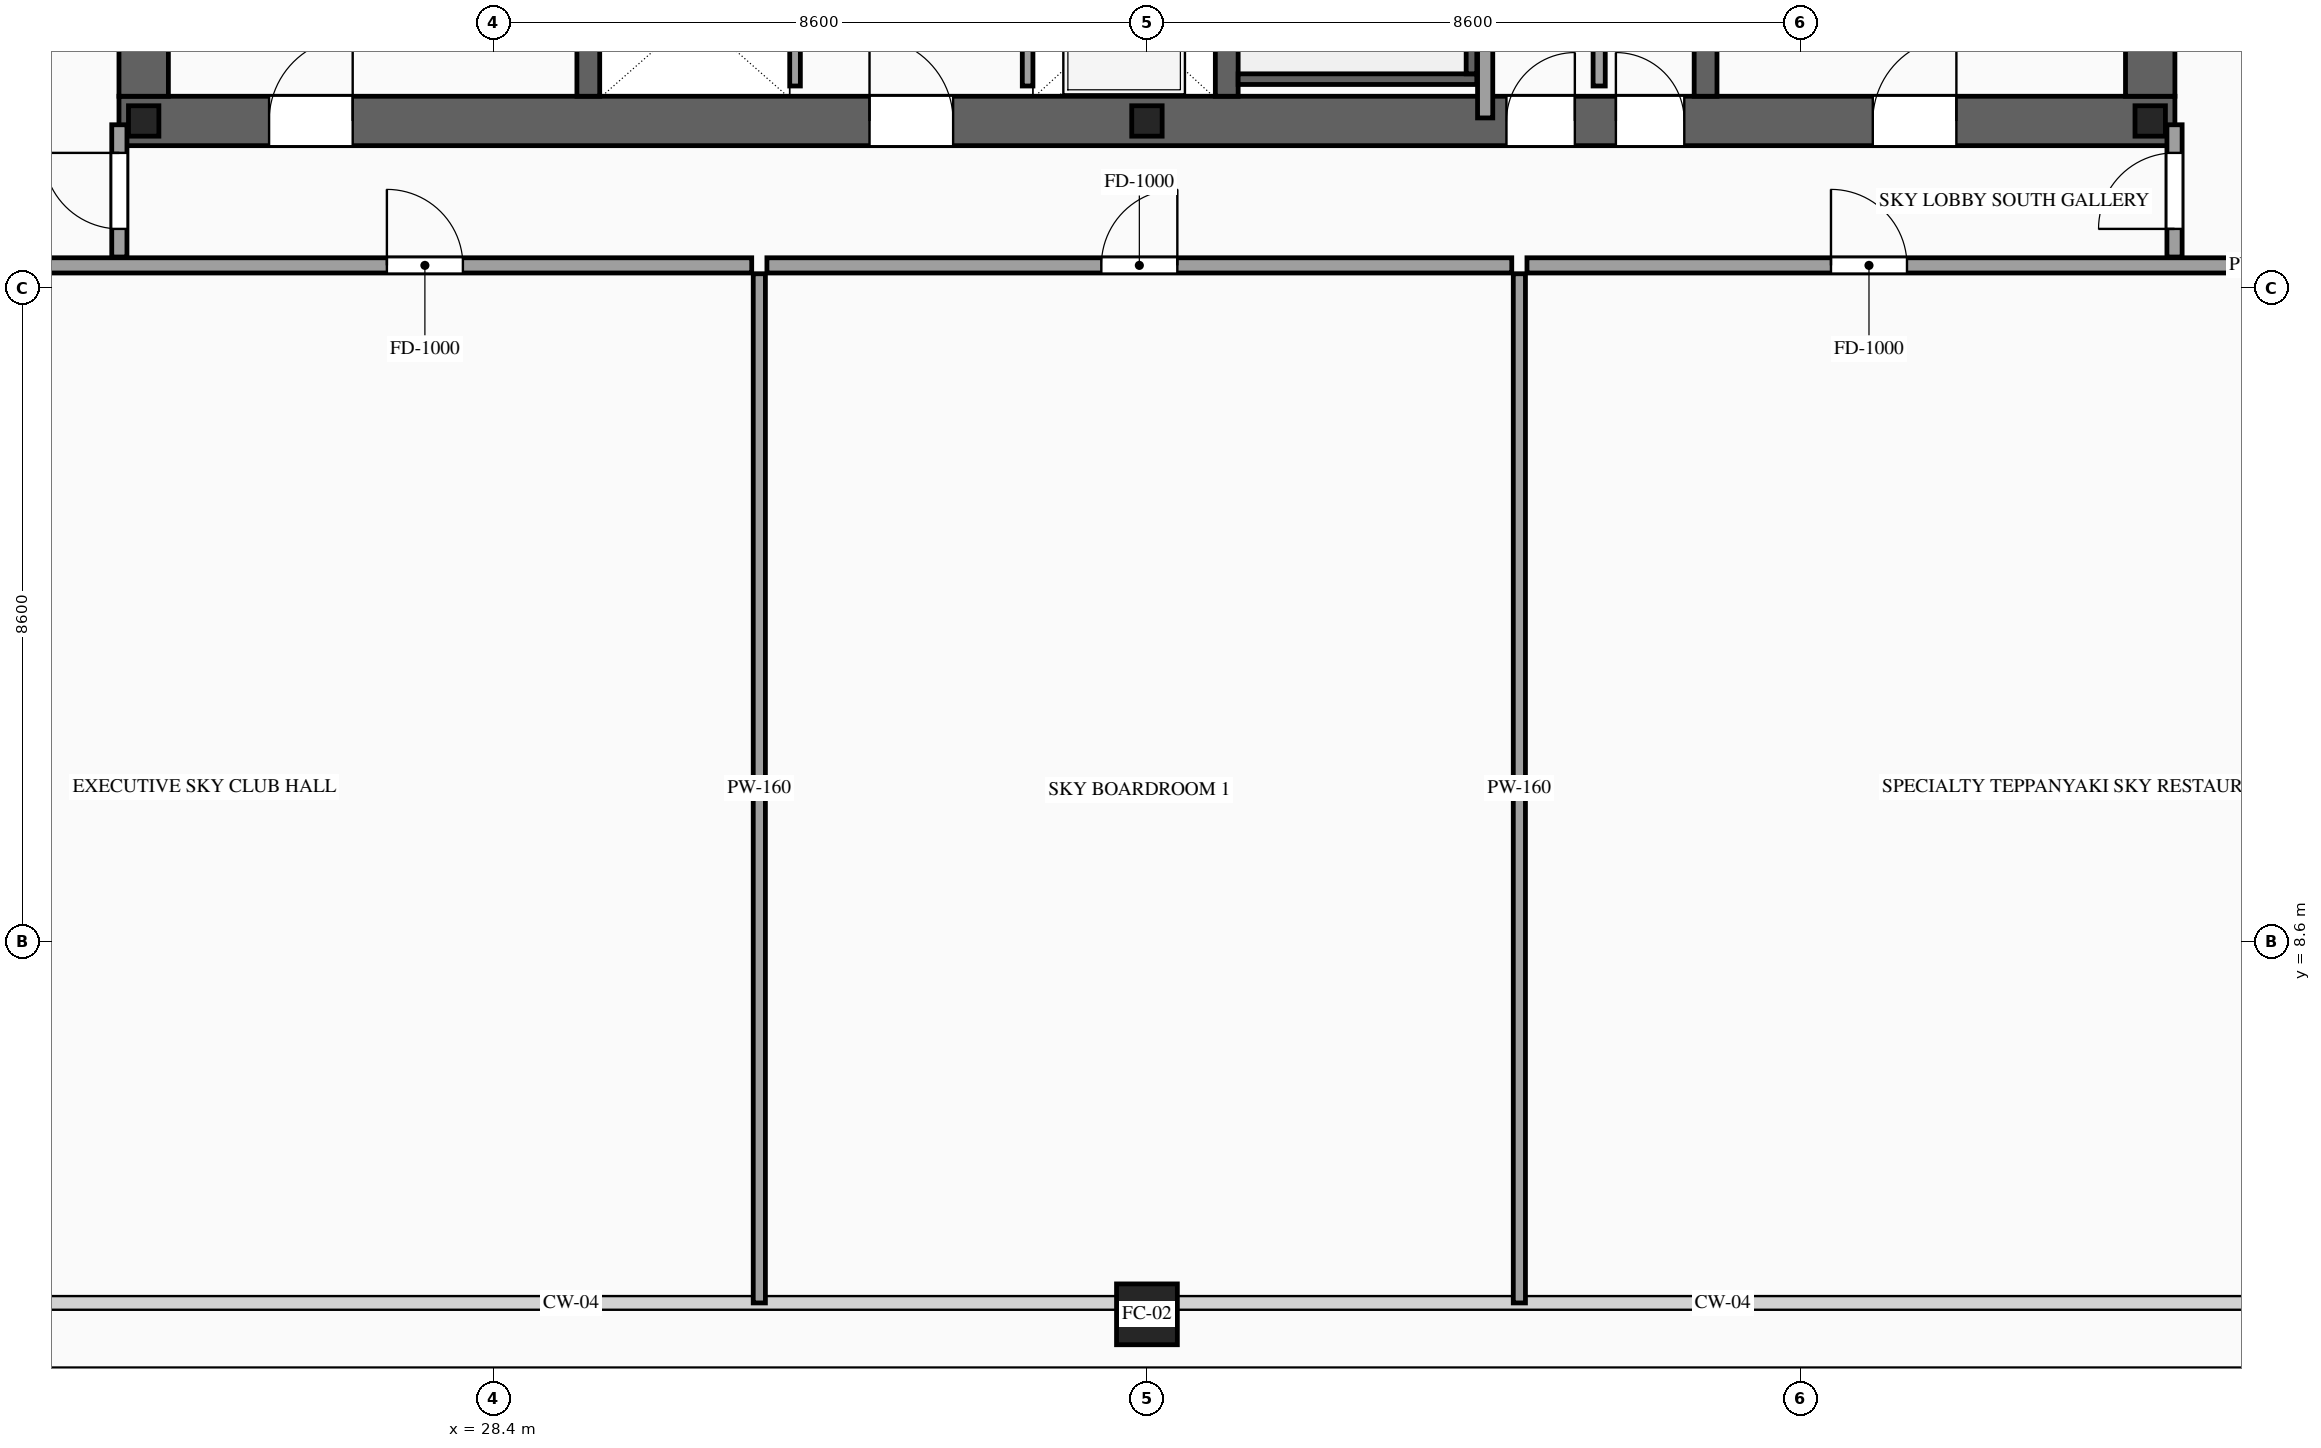
"""IFC4 building model, lengths in metres.
Left out: names, types, materials, properties, quantities, classifications, styles, units other than length and angle.
Written with IfcOpenShell. Run it as: python <this file> out.ifc"""

import sys

from ifc_helpers import new_model, si_unit, direction, frame, frame_2d, origin, origin_2d, place, context, subcontext, project, spatial, rectangle, hollow_rectangle, i_section, extrude, source, transform, mapped, element, fill, save


model = new_model("IFC4")
c1 = context("Model", 3, precision=1e-05, world=origin(), true_north=direction((0.0, 1.0)))
c2 = subcontext(c1, "Body", "Model", "MODEL_VIEW")
j1 = project(units=[si_unit("LENGTHUNIT", "METRE"), si_unit("PLANEANGLEUNIT", "RADIAN")], contexts=[c1])
p1 = place(None, origin())
s1 = spatial("IfcSite", under=j1, at=p1, CompositionType="ELEMENT")
p2 = place(p1, origin())
s2 = spatial("IfcBuilding", under=s1, at=p2, CompositionType="ELEMENT")
p3 = place(p2, frame((0.0, 0.0, 171.6)))
s3 = spatial("IfcBuildingStorey", under=s2, at=p3, CompositionType="ELEMENT", Elevation=171.6)
p4 = place(p3, frame((23.475, 19.4, 0.0), z_axis=(0.0, 0.0, 1.0), x_axis=(1.0, 0.0, 0.0)))
e1 = element("IfcWall", 1, at=p4, inside=s3, PredefinedType="SHEAR", context=c2, shape_type="SweptSolid", body=[
    extrude(rectangle(XDim=27.05, YDim=0.65, at=frame_2d((13.525, 0.0))), origin(), (0.0, 0.0, 1.0), 4.8),
])
p5 = place(p4, frame((1.975, 0.0, 0.0)))
e2 = element("IfcOpeningElement", 2, at=p5, cuts=e1, PredefinedType="OPENING", context=c2, shape_type="SweptSolid", body=[
    extrude(rectangle(XDim=1.1, YDim=2.2, at=frame_2d((0.55, 1.1))), frame((0.0, 0.34, 0.0), z_axis=(0.0, -1.0, 0.0), x_axis=(1.0, 0.0, 0.0)), (0.0, 0.0, 1.0), 0.68),
])
p6 = place(p4, frame((9.875, 0.0, 0.0)))
e3 = element("IfcOpeningElement", 3, at=p6, cuts=e1, PredefinedType="OPENING", context=c2, shape_type="SweptSolid", body=[
    extrude(rectangle(XDim=1.1, YDim=2.2, at=frame_2d((0.55, 1.1))), frame((0.0, 0.34, 0.0), z_axis=(0.0, -1.0, 0.0), x_axis=(1.0, 0.0, 0.0)), (0.0, 0.0, 1.0), 0.68),
])
p7 = place(p4, frame((23.075, 0.0, 0.0)))
e4 = element("IfcOpeningElement", 4, at=p7, cuts=e1, PredefinedType="OPENING", context=c2, shape_type="SweptSolid", body=[
    extrude(rectangle(XDim=1.1, YDim=2.2, at=frame_2d((0.55, 1.1))), frame((0.0, 0.34, 0.0), z_axis=(0.0, -1.0, 0.0), x_axis=(1.0, 0.0, 0.0)), (0.0, 0.0, 1.0), 0.68),
])
p8 = place(p4, frame((19.695, 0.0, 0.0)))
e5 = element("IfcOpeningElement", 5, at=p8, cuts=e1, PredefinedType="OPENING", context=c2, shape_type="SweptSolid", body=[
    extrude(rectangle(XDim=0.9, YDim=2.15, at=frame_2d((0.45, 1.075))), frame((0.0, 0.34, 0.0), z_axis=(0.0, -1.0, 0.0), x_axis=(1.0, 0.0, 0.0)), (0.0, 0.0, 1.0), 0.68),
])
p9 = place(p4, frame((18.255, 0.0, 0.0)))
e6 = element("IfcOpeningElement", 6, at=p9, cuts=e1, PredefinedType="OPENING", context=c2, shape_type="SweptSolid", body=[
    extrude(rectangle(XDim=0.9, YDim=2.15, at=frame_2d((0.45, 1.075))), frame((0.0, 0.34, 0.0), z_axis=(0.0, -1.0, 0.0), x_axis=(1.0, 0.0, 0.0)), (0.0, 0.0, 1.0), 0.68),
])
m1 = source(origin(), c2, "Body", "SweptSolid", [
    extrude(rectangle(XDim=12.15, YDim=0.65, at=frame_2d((6.075, 0.0))), origin(), (0.0, 0.0, 1.0), 4.8),
])
for number, where, z_axis, x_axis in (
    (7, (23.8, 19.725, 0.0), (0.0, 0.0, 1.0), (0.0, 1.0, 0.0)),
    (8, (50.2, 19.725, 0.0), (0.0, 0.0, 1.0), (0.0, 1.0, 0.0)),
):
    element("IfcWall", number, at=place(p3, frame(where, z_axis=z_axis, x_axis=x_axis)), inside=s3, PredefinedType="SHEAR", context=c2, shape_type="MappedRepresentation", body=[
        mapped(m1, transform((0.0, 0.0, 0.0), scale=1.0)),
    ])
m2 = source(origin(), c2, "Body", "SweptSolid", [
    extrude(rectangle(XDim=12.15, YDim=0.3, at=frame_2d((6.075, 0.0))), origin(), (0.0, 0.0, 1.0), 4.8),
])
for number, where, z_axis, x_axis in (
    (9, (29.65, 19.725, 0.0), (0.0, 0.0, 1.0), (0.0, 1.0, 0.0)),
    (10, (38.05, 19.725, 0.0), (0.0, 0.0, 1.0), (0.0, 1.0, 0.0)),
    (11, (44.35, 19.725, 0.0), (0.0, 0.0, 1.0), (0.0, 1.0, 0.0)),
):
    element("IfcWall", number, at=place(p3, frame(where, z_axis=z_axis, x_axis=x_axis)), inside=s3, PredefinedType="SOLIDWALL", context=c2, shape_type="MappedRepresentation", body=[
        mapped(m2, transform((0.0, 0.0, 0.0), scale=1.0)),
    ])
m3 = source(origin(), c2, "Body", "SweptSolid", [
    extrude(i_section(OverallWidth=0.4, OverallDepth=0.4, WebThickness=0.013, FlangeThickness=0.021, at=origin_2d()), origin(), (0.0, 0.0, 1.0), 4.8),
])
for number, where, z_axis, x_axis in (
    (12, (23.8, 19.4, 0.0), (0.0, 0.0, 1.0), (1.0, 0.0, 0.0)),
    (13, (37.0, 19.4, 0.0), (0.0, 0.0, 1.0), (1.0, 0.0, 0.0)),
    (14, (50.2, 19.4, 0.0), (0.0, 0.0, 1.0), (1.0, 0.0, 0.0)),
):
    element("IfcColumn", number, at=place(p3, frame(where, z_axis=z_axis, x_axis=x_axis)), inside=s3, PredefinedType="COLUMN", context=c2, shape_type="MappedRepresentation", body=[
        mapped(m3, transform((0.0, 0.0, 0.0), scale=1.0)),
    ])
m4 = source(origin(), c2, "Body", "SweptSolid", [
    extrude(hollow_rectangle(XDim=0.8, YDim=0.8, WallThickness=0.036, at=origin_2d()), origin(), (0.0, 0.0, 1.0), 4.8),
])
p10 = place(p3, frame((37.0, 3.7, 0.0), z_axis=(0.0, 0.0, 1.0), x_axis=(1.0, 0.0, 0.0)))
e15 = element("IfcColumn", 15, at=p10, inside=s3, PredefinedType="COLUMN", context=c2, shape_type="MappedRepresentation", body=[
    mapped(m4, transform((0.0, 0.0, 0.0), scale=1.0)),
])
m5 = source(origin(), c2, "Body", "SweptSolid", [
    extrude(rectangle(XDim=2.04, YDim=0.14, at=frame_2d((1.02, 0.0))), origin(), (0.0, 0.0, 1.0), 4.52),
])
p11 = place(p3, frame((32.37, 19.86, 0.0), z_axis=(0.0, 0.0, 1.0), x_axis=(0.0, 1.0, 0.0)))
e16 = element("IfcWall", 16, at=p11, inside=s3, PredefinedType="SOLIDWALL", context=c2, shape_type="MappedRepresentation", body=[
    mapped(m5, transform((0.0, 0.0, 0.0), scale=1.0)),
])
p12 = place(p3, frame((35.43, 19.86, 0.0), z_axis=(0.0, 0.0, 1.0), x_axis=(0.0, 1.0, 0.0)))
e17 = element("IfcWall", 17, at=p12, inside=s3, PredefinedType="SOLIDWALL", context=c2, shape_type="SweptSolid", body=[
    extrude(rectangle(XDim=2.04, YDim=0.14, at=frame_2d((1.02, 0.0))), origin(), (0.0, 0.0, 1.0), 4.52),
])
p13 = place(p12, frame((0.47, 0.0, 0.0)))
e18 = element("IfcOpeningElement", 18, at=p13, cuts=e17, PredefinedType="OPENING", context=c2, shape_type="SweptSolid", body=[
    extrude(rectangle(XDim=1.1, YDim=2.2, at=frame_2d((0.55, 1.1))), frame((0.0, 0.085, 0.0), z_axis=(0.0, -1.0, 0.0), x_axis=(1.0, 0.0, 0.0)), (0.0, 0.0, 1.0), 0.17),
])
m6 = source(origin(), c2, "Body", "SweptSolid", [
    extrude(rectangle(XDim=3.14, YDim=0.14, at=frame_2d((1.57, 0.0))), origin(), (0.0, 0.0, 1.0), 4.52),
])
p14 = place(p3, frame((38.2, 19.95, 0.0), z_axis=(0.0, 0.0, 1.0), x_axis=(1.0, 0.0, 0.0)))
e19 = element("IfcWall", 19, at=p14, inside=s3, PredefinedType="SOLIDWALL", context=c2, shape_type="MappedRepresentation", body=[
    mapped(m6, transform((0.0, 0.0, 0.0), scale=1.0)),
])
m7 = source(origin(), c2, "Body", "SweptSolid", [
    extrude(rectangle(XDim=8.94, YDim=0.14, at=frame_2d((4.47, 0.0))), origin(), (0.0, 0.0, 1.0), 4.52),
])
p15 = place(p3, frame((41.27, 20.02, 0.0), z_axis=(0.0, 0.0, 1.0), x_axis=(0.0, 1.0, 0.0)))
e20 = element("IfcWall", 20, at=p15, inside=s3, PredefinedType="SOLIDWALL", context=c2, shape_type="MappedRepresentation", body=[
    mapped(m7, transform((0.0, 0.0, 0.0), scale=1.0)),
])
m8 = source(origin(), c2, "Body", "SweptSolid", [
    extrude(rectangle(XDim=1.34, YDim=0.16, at=frame_2d((0.67, 0.0))), origin(), (0.0, 0.0, 1.0), 4.52),
])
p16 = place(p3, frame((42.95, 19.86, 0.0), z_axis=(0.0, 0.0, 1.0), x_axis=(0.0, 1.0, 0.0)))
e21 = element("IfcWall", 21, at=p16, inside=s3, PredefinedType="PARTITIONING", context=c2, shape_type="MappedRepresentation", body=[
    mapped(m8, transform((0.0, 0.0, 0.0), scale=1.0)),
])
m9 = source(origin(), c2, "Body", "SweptSolid", [
    extrude(rectangle(XDim=12.72, YDim=0.2, at=frame_2d((6.36, 0.0))), origin(), (0.0, 0.0, 1.0), 4.52),
])
p17 = place(p3, frame((41.45, 19.44, 0.0), z_axis=(0.0, 0.0, 1.0), x_axis=(0.0, 1.0, 0.0)))
e22 = element("IfcWall", 22, at=p17, inside=s3, PredefinedType="PARTITIONING", context=c2, shape_type="MappedRepresentation", body=[
    mapped(m9, transform((0.0, 0.0, 0.0), scale=1.0)),
])
p18 = place(p3, frame((17.94, 17.5, 0.0), z_axis=(0.0, 0.0, 1.0), x_axis=(1.0, 0.0, 0.0)))
e23 = element("IfcWall", 23, at=p18, inside=s3, PredefinedType="PARTITIONING", context=c2, shape_type="SweptSolid", body=[
    extrude(rectangle(XDim=13.86, YDim=0.2, at=frame_2d((6.93, 0.0))), origin(), (0.0, 0.0, 1.0), 4.52),
])
p19 = place(p18, frame((9.06, 0.0, 0.0)))
e24 = element("IfcOpeningElement", 24, at=p19, cuts=e23, PredefinedType="OPENING", context=c2, shape_type="SweptSolid", body=[
    extrude(rectangle(XDim=1.0, YDim=2.2, at=frame_2d((0.5, 1.1))), frame((0.0, 0.115, 0.0), z_axis=(0.0, -1.0, 0.0), x_axis=(1.0, 0.0, 0.0)), (0.0, 0.0, 1.0), 0.23),
])
m10 = source(origin(), c2, "Body", "SweptSolid", [
    extrude(rectangle(XDim=13.54, YDim=0.16, at=frame_2d((6.77, 0.0))), origin(), (0.0, 0.0, 1.0), 4.52),
])
p20 = place(p3, frame((31.9, 3.85, 0.0), z_axis=(0.0, 0.0, 1.0), x_axis=(0.0, 1.0, 0.0)))
e25 = element("IfcWall", 25, at=p20, inside=s3, PredefinedType="PARTITIONING", context=c2, shape_type="MappedRepresentation", body=[
    mapped(m10, transform((0.0, 0.0, 0.0), scale=1.0)),
])
p21 = place(p3, frame((32.0, 17.5, 0.0), z_axis=(0.0, 0.0, 1.0), x_axis=(1.0, 0.0, 0.0)))
e26 = element("IfcWall", 26, at=p21, inside=s3, PredefinedType="PARTITIONING", context=c2, shape_type="SweptSolid", body=[
    extrude(rectangle(XDim=9.8, YDim=0.2, at=frame_2d((4.9, 0.0))), origin(), (0.0, 0.0, 1.0), 4.52),
])
p22 = place(p21, frame((4.4, 0.0, 0.0)))
e27 = element("IfcOpeningElement", 27, at=p22, cuts=e26, PredefinedType="OPENING", context=c2, shape_type="SweptSolid", body=[
    extrude(rectangle(XDim=1.0, YDim=2.2, at=frame_2d((0.5, 1.1))), frame((0.0, 0.115, 0.0), z_axis=(0.0, -1.0, 0.0), x_axis=(1.0, 0.0, 0.0)), (0.0, 0.0, 1.0), 0.23),
])
p23 = place(p3, frame((41.9, 3.85, 0.0), z_axis=(0.0, 0.0, 1.0), x_axis=(0.0, 1.0, 0.0)))
e28 = element("IfcWall", 28, at=p23, inside=s3, PredefinedType="PARTITIONING", context=c2, shape_type="MappedRepresentation", body=[
    mapped(m10, transform((0.0, 0.0, 0.0), scale=1.0)),
])
p24 = place(p3, frame((42.0, 17.5, 0.0), z_axis=(0.0, 0.0, 1.0), x_axis=(1.0, 0.0, 0.0)))
e29 = element("IfcWall", 29, at=p24, inside=s3, PredefinedType="PARTITIONING", context=c2, shape_type="SweptSolid", body=[
    extrude(rectangle(XDim=14.06, YDim=0.2, at=frame_2d((7.03, 0.0))), origin(), (0.0, 0.0, 1.0), 4.52),
])
p25 = place(p24, frame((4.0, 0.0, 0.0)))
e30 = element("IfcOpeningElement", 30, at=p25, cuts=e29, PredefinedType="OPENING", context=c2, shape_type="SweptSolid", body=[
    extrude(rectangle(XDim=1.0, YDim=2.2, at=frame_2d((0.5, 1.1))), frame((0.0, 0.115, 0.0), z_axis=(0.0, -1.0, 0.0), x_axis=(1.0, 0.0, 0.0)), (0.0, 0.0, 1.0), 0.23),
])
p26 = place(p3, frame((23.48, 17.61, 0.0), z_axis=(0.0, 0.0, 1.0), x_axis=(0.0, 1.0, 0.0)))
e31 = element("IfcWall", 31, at=p26, inside=s3, PredefinedType="PARTITIONING", context=c2, shape_type="SweptSolid", body=[
    extrude(rectangle(XDim=1.74, YDim=0.2, at=frame_2d((0.87, 0.0))), origin(), (0.0, 0.0, 1.0), 4.52),
])
p27 = place(p26, frame((0.37, 0.0, 0.0)))
e32 = element("IfcOpeningElement", 32, at=p27, cuts=e31, PredefinedType="OPENING", context=c2, shape_type="SweptSolid", body=[
    extrude(rectangle(XDim=1.0, YDim=2.2, at=frame_2d((0.5, 1.1))), frame((0.0, 0.115, 0.0), z_axis=(0.0, -1.0, 0.0), x_axis=(1.0, 0.0, 0.0)), (0.0, 0.0, 1.0), 0.23),
])
p28 = place(p3, frame((50.52, 17.61, 0.0), z_axis=(0.0, 0.0, 1.0), x_axis=(0.0, 1.0, 0.0)))
e33 = element("IfcWall", 33, at=p28, inside=s3, PredefinedType="PARTITIONING", context=c2, shape_type="SweptSolid", body=[
    extrude(rectangle(XDim=1.74, YDim=0.2, at=frame_2d((0.87, 0.0))), origin(), (0.0, 0.0, 1.0), 4.52),
])
p29 = place(p28, frame((0.37, 0.0, 0.0)))
e34 = element("IfcOpeningElement", 34, at=p29, cuts=e33, PredefinedType="OPENING", context=c2, shape_type="SweptSolid", body=[
    extrude(rectangle(XDim=1.0, YDim=2.2, at=frame_2d((0.5, 1.1))), frame((0.0, 0.115, 0.0), z_axis=(0.0, -1.0, 0.0), x_axis=(1.0, 0.0, 0.0)), (0.0, 0.0, 1.0), 0.23),
])
m11 = source(origin(), c2, "Body", "SweptSolid", [
    extrude(rectangle(XDim=1.1, YDim=2.2, at=frame_2d((0.55, 1.1))), frame((0.0, 0.025, 0.0), z_axis=(0.0, -1.0, 0.0), x_axis=(1.0, 0.0, 0.0)), (0.0, 0.0, 1.0), 0.05),
])
p30 = place(p5, origin())
e35 = element("IfcDoor", 35, at=p30, inside=s3, OperationType="SINGLE_SWING_RIGHT", PredefinedType="DOOR", context=c2, shape_type="MappedRepresentation", body=[
    mapped(m11, transform((0.0, 0.0, 0.0), scale=1.0)),
])
fill(e2, e35)
p31 = place(p6, origin())
e36 = element("IfcDoor", 36, at=p31, inside=s3, OperationType="SINGLE_SWING_LEFT", PredefinedType="DOOR", context=c2, shape_type="MappedRepresentation", body=[
    mapped(m11, transform((0.0, 0.0, 0.0), scale=1.0)),
])
fill(e3, e36)
p32 = place(p7, origin())
e37 = element("IfcDoor", 37, at=p32, inside=s3, OperationType="SINGLE_SWING_RIGHT", PredefinedType="DOOR", context=c2, shape_type="MappedRepresentation", body=[
    mapped(m11, transform((0.0, 0.0, 0.0), scale=1.0)),
])
fill(e4, e37)
m12 = source(origin(), c2, "Body", "SweptSolid", [
    extrude(rectangle(XDim=0.9, YDim=2.15, at=frame_2d((0.45, 1.075))), frame((0.0, 0.025, 0.0), z_axis=(0.0, -1.0, 0.0), x_axis=(1.0, 0.0, 0.0)), (0.0, 0.0, 1.0), 0.05),
])
p33 = place(p8, origin())
e38 = element("IfcDoor", 38, at=p33, inside=s3, OperationType="SINGLE_SWING_LEFT", PredefinedType="DOOR", context=c2, shape_type="MappedRepresentation", body=[
    mapped(m12, transform((0.0, 0.0, 0.0), scale=1.0)),
])
fill(e5, e38)
p34 = place(p9, origin())
e39 = element("IfcDoor", 39, at=p34, inside=s3, OperationType="SINGLE_SWING_RIGHT", PredefinedType="DOOR", context=c2, shape_type="MappedRepresentation", body=[
    mapped(m12, transform((0.0, 0.0, 0.0), scale=1.0)),
])
fill(e6, e39)
m13 = source(origin(), c2, "Body", "SweptSolid", [
    extrude(rectangle(XDim=1.0, YDim=2.2, at=frame_2d((0.5, 1.1))), frame((0.0, 0.025, 0.0), z_axis=(0.0, -1.0, 0.0), x_axis=(1.0, 0.0, 0.0)), (0.0, 0.0, 1.0), 0.05),
])
p35 = place(p19, origin())
e40 = element("IfcDoor", 40, at=p35, inside=s3, OperationType="SINGLE_SWING_LEFT", PredefinedType="DOOR", context=c2, shape_type="MappedRepresentation", body=[
    mapped(m13, transform((0.0, 0.0, 0.0), scale=1.0)),
])
fill(e24, e40)
p36 = place(p22, origin())
e41 = element("IfcDoor", 41, at=p36, inside=s3, OperationType="SINGLE_SWING_RIGHT", PredefinedType="DOOR", context=c2, shape_type="MappedRepresentation", body=[
    mapped(m13, transform((0.0, 0.0, 0.0), scale=1.0)),
])
fill(e27, e41)
p37 = place(p25, origin())
e42 = element("IfcDoor", 42, at=p37, inside=s3, OperationType="SINGLE_SWING_LEFT", PredefinedType="DOOR", context=c2, shape_type="MappedRepresentation", body=[
    mapped(m13, transform((0.0, 0.0, 0.0), scale=1.0)),
])
fill(e30, e42)
p38 = place(p27, origin())
e43 = element("IfcDoor", 43, at=p38, inside=s3, OperationType="SINGLE_SWING_RIGHT", PredefinedType="DOOR", context=c2, shape_type="MappedRepresentation", body=[
    mapped(m13, transform((0.0, 0.0, 0.0), scale=1.0)),
])
fill(e32, e43)
p39 = place(p29, origin())
e44 = element("IfcDoor", 44, at=p39, inside=s3, OperationType="SINGLE_SWING_LEFT", PredefinedType="DOOR", context=c2, shape_type="MappedRepresentation", body=[
    mapped(m13, transform((0.0, 0.0, 0.0), scale=1.0)),
])
fill(e34, e44)
save(model, sys.argv[1])
